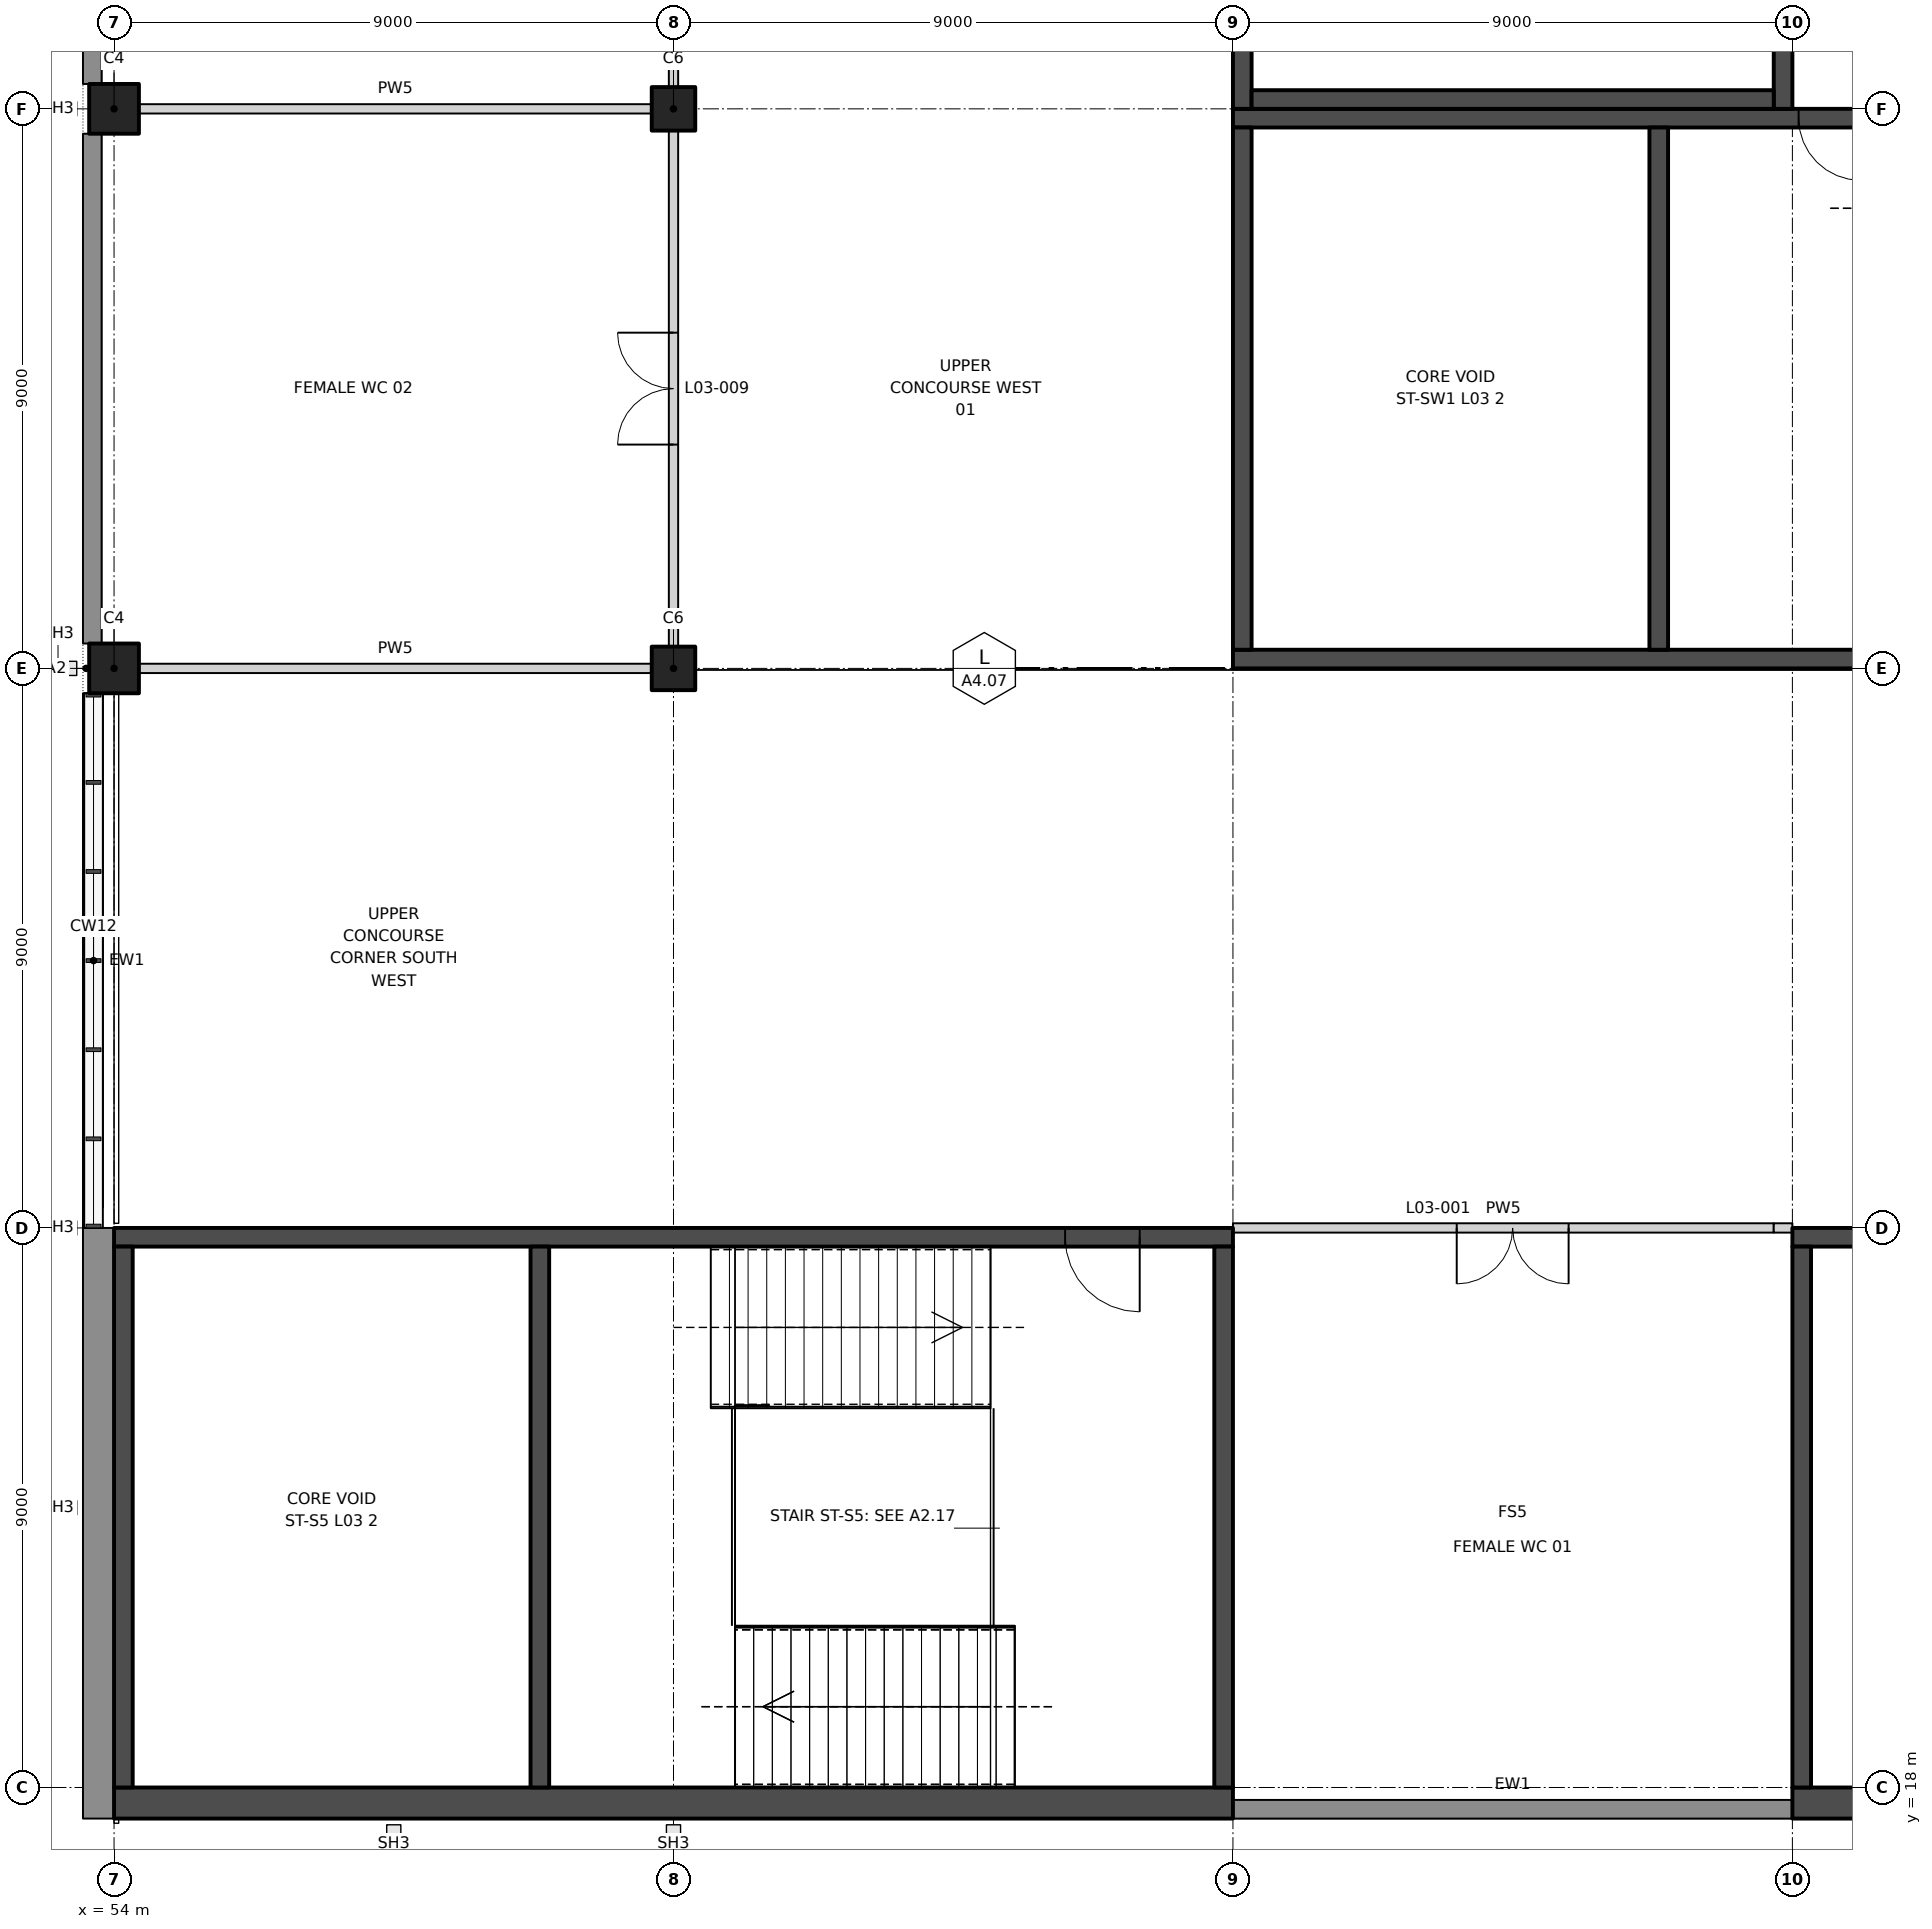
"""IFC4 building model, lengths in metres.
Left out: names, types, materials, properties, quantities, classifications, styles, units other than length and angle.
Written with IfcOpenShell. Run it as: python <this file> out.ifc"""

import sys

from ifc_helpers import new_model, si_unit, direction, frame, frame_2d, origin, origin_2d, place, context, subcontext, project, spatial, rectangle, extrude, element, fill, save


model = new_model("IFC4")
c1 = context("Model", 3, precision=1e-05, world=origin(), true_north=direction((0.0, 1.0)))
c2 = subcontext(c1, "Body", "Model", "MODEL_VIEW")
j1 = project(units=[si_unit("LENGTHUNIT", "METRE"), si_unit("PLANEANGLEUNIT", "RADIAN")], contexts=[c1])
p1 = place(None, origin())
s1 = spatial("IfcSite", under=j1, at=p1, CompositionType="ELEMENT")
p2 = place(p1, origin())
s2 = spatial("IfcBuilding", under=s1, at=p2, CompositionType="ELEMENT")
p3 = place(p2, frame((0.0, 0.0, 22.0)))
s3 = spatial("IfcBuildingStorey", under=s2, at=p3, CompositionType="ELEMENT", Elevation=22.0)
for number, where, z_axis, x_axis in (
    (1, (54.0, 36.0, 0.0), (0.0, 0.0, 1.0), (1.0, 0.0, 0.0)),
    (2, (54.0, 45.0, 0.0), (0.0, 0.0, 1.0), (1.0, 0.0, 0.0)),
):
    element("IfcColumn", number, at=place(p3, frame(where, z_axis=z_axis, x_axis=x_axis)), inside=s3, PredefinedType="COLUMN", context=c2, shape_type="SweptSolid", body=[
        extrude(rectangle(XDim=0.8, YDim=0.8, at=origin_2d()), origin(), (0.0, 0.0, 1.0), 6.0),
    ])
for number, where, z_axis, x_axis in (
    (3, (63.0, 36.0, 0.0), (0.0, 0.0, 1.0), (1.0, 0.0, 0.0)),
    (4, (63.0, 45.0, 0.0), (0.0, 0.0, 1.0), (1.0, 0.0, 0.0)),
):
    element("IfcColumn", number, at=place(p3, frame(where, z_axis=z_axis, x_axis=x_axis)), inside=s3, PredefinedType="COLUMN", context=c2, shape_type="SweptSolid", body=[
        extrude(rectangle(XDim=0.7, YDim=0.7, at=origin_2d()), origin(), (0.0, 0.0, 1.0), 6.0),
    ])
p4 = place(p3, frame((72.0, 27.0, 0.0), z_axis=(0.0, 0.0, 1.0), x_axis=(1.0, 0.0, 0.0)))
e5 = element("IfcWall", 5, at=p4, inside=s3, PredefinedType="PARTITIONING", context=c2, shape_type="SweptSolid", body=[
    extrude(rectangle(XDim=8.7, YDim=0.15, at=frame_2d((4.35, 0.0))), origin(), (0.0, 0.0, 1.0), 4.7),
])
p5 = place(p4, frame((3.6, 0.0, 0.0)))
e6 = element("IfcOpeningElement", 6, at=p5, cuts=e5, PredefinedType="OPENING", context=c2, shape_type="SweptSolid", body=[
    extrude(rectangle(XDim=1.8, YDim=2.1, at=frame_2d((0.9, 1.05))), frame((0.0, 0.085, 0.0), z_axis=(0.0, -1.0, 0.0), x_axis=(1.0, 0.0, 0.0)), (0.0, 0.0, 1.0), 0.17),
])
for number, where, z_axis, x_axis in (
    (7, (54.4, 36.0, 0.0), (0.0, 0.0, 1.0), (1.0, 0.0, 0.0)),
    (8, (54.4, 45.0, 0.0), (0.0, 0.0, 1.0), (1.0, 0.0, 0.0)),
):
    element("IfcWall", number, at=place(p3, frame(where, z_axis=z_axis, x_axis=x_axis)), inside=s3, PredefinedType="PARTITIONING", context=c2, shape_type="SweptSolid", body=[
        extrude(rectangle(XDim=8.25, YDim=0.15, at=frame_2d((4.125, 0.0))), origin(), (0.0, 0.0, 1.0), 4.8),
    ])
p6 = place(p3, frame((63.0, 36.35, 0.0), z_axis=(0.0, 0.0, 1.0), x_axis=(0.0, 1.0, 0.0)))
e9 = element("IfcWall", 9, at=p6, inside=s3, PredefinedType="PARTITIONING", context=c2, shape_type="SweptSolid", body=[
    extrude(rectangle(XDim=8.3, YDim=0.15, at=frame_2d((4.15, 0.0))), origin(), (0.0, 0.0, 1.0), 4.8),
])
p7 = place(p6, frame((3.25, 0.0, 0.0)))
e10 = element("IfcOpeningElement", 10, at=p7, cuts=e9, PredefinedType="OPENING", context=c2, shape_type="SweptSolid", body=[
    extrude(rectangle(XDim=1.8, YDim=2.1, at=frame_2d((0.9, 1.05))), frame((0.0, 0.085, 0.0), z_axis=(0.0, -1.0, 0.0), x_axis=(1.0, 0.0, 0.0)), (0.0, 0.0, 1.0), 0.17),
])
p8 = place(p3, frame((63.0, 45.35, 0.0), z_axis=(0.0, 0.0, 1.0), x_axis=(0.0, 1.0, 0.0)))
e11 = element("IfcWall", 11, at=p8, inside=s3, PredefinedType="PARTITIONING", context=c2, shape_type="SweptSolid", body=[
    extrude(rectangle(XDim=8.65, YDim=0.15, at=frame_2d((4.325, 0.0))), origin(), (0.0, 0.0, 1.0), 4.7),
])
p9 = place(p8, frame((3.425, 0.0, 0.0)))
e12 = element("IfcOpeningElement", 12, at=p9, cuts=e11, PredefinedType="OPENING", context=c2, shape_type="SweptSolid", body=[
    extrude(rectangle(XDim=1.8, YDim=2.1, at=frame_2d((0.9, 1.05))), frame((0.0, 0.085, 0.0), z_axis=(0.0, -1.0, 0.0), x_axis=(1.0, 0.0, 0.0)), (0.0, 0.0, 1.0), 0.17),
])
p10 = place(p3, frame((72.0, 17.65, 0.0), z_axis=(0.0, 0.0, 1.0), x_axis=(1.0, 0.0, 0.0)))
e13 = element("IfcWall", 13, at=p10, inside=s3, PredefinedType="SOLIDWALL", context=c2, shape_type="SweptSolid", body=[
    extrude(rectangle(XDim=9.0, YDim=0.3, at=frame_2d((4.5, 0.0))), origin(), (0.0, 0.0, 1.0), 6.0),
])
p11 = place(p3, frame((53.75, 27.0, 0.0), z_axis=(0.0, 0.0, 1.0), x_axis=(0.0, -1.0, 0.0)))
e14 = element("IfcWall", 14, at=p11, inside=s3, PredefinedType="SOLIDWALL", context=c2, shape_type="SweptSolid", body=[
    extrude(rectangle(XDim=9.5, YDim=0.5, at=frame_2d((4.75, 0.0))), origin(), (0.0, 0.0, 1.0), 6.0),
])
p12 = place(p3, frame((53.65, 35.6, 0.0), z_axis=(0.0, 0.0, 1.0), x_axis=(0.0, -1.0, 0.0)))
e15 = element("IfcWall", 15, at=p12, inside=s3, PredefinedType="SOLIDWALL", context=c2, shape_type="SweptSolid", body=[
    extrude(rectangle(XDim=8.6, YDim=0.3, at=frame_2d((4.3, 0.0))), origin(), (0.0, 0.0, 1.0), 1.0),
])
p13 = place(p3, frame((53.65, 44.6, 0.0), z_axis=(0.0, 0.0, 1.0), x_axis=(0.0, -1.0, 0.0)))
e16 = element("IfcWall", 16, at=p13, inside=s3, PredefinedType="SOLIDWALL", context=c2, shape_type="SweptSolid", body=[
    extrude(rectangle(XDim=8.2, YDim=0.3, at=frame_2d((4.1, 0.0))), origin(), (0.0, 0.0, 1.0), 6.0),
])
p14 = place(p3, frame((53.65, 54.0, 0.0), z_axis=(0.0, 0.0, 1.0), x_axis=(0.0, -1.0, 0.0)))
e17 = element("IfcWall", 17, at=p14, inside=s3, PredefinedType="SOLIDWALL", context=c2, shape_type="SweptSolid", body=[
    extrude(rectangle(XDim=8.6, YDim=0.3, at=frame_2d((4.3, 0.0))), origin(), (0.0, 0.0, 1.0), 6.0),
])
p15 = place(p3, frame((81.0, 26.85, 0.0), z_axis=(0.0, 0.0, 1.0), x_axis=(1.0, 0.0, 0.0)))
e18 = element("IfcWall", 18, at=p15, inside=s3, PredefinedType="SHEAR", context=c2, shape_type="SweptSolid", body=[
    extrude(rectangle(XDim=18.0, YDim=0.3, at=frame_2d((9.0, 0.0))), origin(), (0.0, 0.0, 1.0), 6.0),
])
p16 = place(p15, frame((1.5, 0.0, 0.0)))
e19 = element("IfcOpeningElement", 19, at=p16, cuts=e18, PredefinedType="OPENING", context=c2, shape_type="SweptSolid", body=[
    extrude(rectangle(XDim=1.2, YDim=2.1, at=frame_2d((0.6, 1.05))), frame((0.0, 0.16, 0.0), z_axis=(0.0, -1.0, 0.0), x_axis=(1.0, 0.0, 0.0)), (0.0, 0.0, 1.0), 0.32),
])
p17 = place(p3, frame((81.0, 17.75, 0.0), z_axis=(0.0, 0.0, 1.0), x_axis=(1.0, 0.0, 0.0)))
e20 = element("IfcWall", 20, at=p17, inside=s3, PredefinedType="SHEAR", context=c2, shape_type="SweptSolid", body=[
    extrude(rectangle(XDim=18.0, YDim=0.5, at=frame_2d((9.0, 0.0))), origin(), (0.0, 0.0, 1.0), 6.0),
])
p18 = place(p3, frame((81.15, 26.7, 0.0), z_axis=(0.0, 0.0, 1.0), x_axis=(0.0, -1.0, 0.0)))
e21 = element("IfcWall", 21, at=p18, inside=s3, PredefinedType="SHEAR", context=c2, shape_type="SweptSolid", body=[
    extrude(rectangle(XDim=8.7, YDim=0.3, at=frame_2d((4.35, 0.0))), origin(), (0.0, 0.0, 1.0), 6.0),
])
p19 = place(p3, frame((72.0, 26.85, 0.0), z_axis=(0.0, 0.0, 1.0), x_axis=(-1.0, 0.0, 0.0)))
e22 = element("IfcWall", 22, at=p19, inside=s3, PredefinedType="SHEAR", context=c2, shape_type="SweptSolid", body=[
    extrude(rectangle(XDim=18.0, YDim=0.3, at=frame_2d((9.0, 0.0))), origin(), (0.0, 0.0, 1.0), 6.0),
])
p20 = place(p19, frame((1.5, 0.0, 0.0)))
e23 = element("IfcOpeningElement", 23, at=p20, cuts=e22, PredefinedType="OPENING", context=c2, shape_type="SweptSolid", body=[
    extrude(rectangle(XDim=1.2, YDim=2.1, at=frame_2d((0.6, 1.05))), frame((0.0, 0.16, 0.0), z_axis=(0.0, -1.0, 0.0), x_axis=(1.0, 0.0, 0.0)), (0.0, 0.0, 1.0), 0.32),
])
p21 = place(p3, frame((72.0, 17.75, 0.0), z_axis=(0.0, 0.0, 1.0), x_axis=(-1.0, 0.0, 0.0)))
e24 = element("IfcWall", 24, at=p21, inside=s3, PredefinedType="SHEAR", context=c2, shape_type="SweptSolid", body=[
    extrude(rectangle(XDim=18.0, YDim=0.5, at=frame_2d((9.0, 0.0))), origin(), (0.0, 0.0, 1.0), 6.0),
])
for number, where, z_axis, x_axis in (
    (25, (71.85, 26.7, 0.0), (0.0, 0.0, 1.0), (0.0, -1.0, 0.0)),
    (26, (54.15, 26.7, 0.0), (0.0, 0.0, 1.0), (0.0, -1.0, 0.0)),
    (27, (60.85, 26.7, 0.0), (0.0, 0.0, 1.0), (0.0, -1.0, 0.0)),
):
    element("IfcWall", number, at=place(p3, frame(where, z_axis=z_axis, x_axis=x_axis)), inside=s3, PredefinedType="SHEAR", context=c2, shape_type="SweptSolid", body=[
        extrude(rectangle(XDim=8.7, YDim=0.3, at=frame_2d((4.35, 0.0))), origin(), (0.0, 0.0, 1.0), 6.0),
    ])
p22 = place(p3, frame((90.25, 44.85, 0.0), z_axis=(0.0, 0.0, 1.0), x_axis=(-1.0, 0.0, 0.0)))
e28 = element("IfcWall", 28, at=p22, inside=s3, PredefinedType="SHEAR", context=c2, shape_type="SweptSolid", body=[
    extrude(rectangle(XDim=18.25, YDim=0.3, at=frame_2d((9.125, 0.0))), origin(), (0.0, 0.0, 1.0), 6.0),
])
p23 = place(p22, frame((8.15, 0.0, 0.0)))
e29 = element("IfcOpeningElement", 29, at=p23, cuts=e28, PredefinedType="OPENING", context=c2, shape_type="SweptSolid", body=[
    extrude(rectangle(XDim=1.0, YDim=2.1, at=frame_2d((0.5, 1.05))), frame((0.0, 0.16, 0.0), z_axis=(0.0, -1.0, 0.0), x_axis=(1.0, 0.0, 0.0)), (0.0, 0.0, 1.0), 0.32),
])
p24 = place(p3, frame((90.0, 36.15, 0.0), z_axis=(0.0, 0.0, 1.0), x_axis=(-1.0, 0.0, 0.0)))
e30 = element("IfcWall", 30, at=p24, inside=s3, PredefinedType="SHEAR", context=c2, shape_type="SweptSolid", body=[
    extrude(rectangle(XDim=18.0, YDim=0.3, at=frame_2d((9.0, 0.0))), origin(), (0.0, 0.0, 1.0), 6.0),
])
for number, where, z_axis, x_axis in (
    (31, (72.15, 44.7, 0.0), (0.0, 0.0, 1.0), (0.0, -1.0, 0.0)),
    (32, (78.85, 44.7, 0.0), (0.0, 0.0, 1.0), (0.0, -1.0, 0.0)),
):
    element("IfcWall", number, at=place(p3, frame(where, z_axis=z_axis, x_axis=x_axis)), inside=s3, PredefinedType="SHEAR", context=c2, shape_type="SweptSolid", body=[
        extrude(rectangle(XDim=8.4, YDim=0.3, at=frame_2d((4.2, 0.0))), origin(), (0.0, 0.0, 1.0), 6.0),
    ])
p25 = place(p3, frame((80.85, 63.0, 0.0), z_axis=(0.0, 0.0, 1.0), x_axis=(0.0, -1.0, 0.0)))
e33 = element("IfcWall", 33, at=p25, inside=s3, PredefinedType="SHEAR", context=c2, shape_type="SweptSolid", body=[
    extrude(rectangle(XDim=18.0, YDim=0.3, at=frame_2d((9.0, 0.0))), origin(), (0.0, 0.0, 1.0), 6.0),
])
p26 = place(p25, frame((8.6, 0.0, 0.0)))
e34 = element("IfcOpeningElement", 34, at=p26, cuts=e33, PredefinedType="OPENING", context=c2, shape_type="SweptSolid", body=[
    extrude(rectangle(XDim=1.2, YDim=2.1, at=frame_2d((0.6, 1.05))), frame((0.0, 0.16, 0.0), z_axis=(0.0, -1.0, 0.0), x_axis=(1.0, 0.0, 0.0)), (0.0, 0.0, 1.0), 0.32),
])
p27 = place(p3, frame((72.15, 63.0, 0.0), z_axis=(0.0, 0.0, 1.0), x_axis=(0.0, -1.0, 0.0)))
e35 = element("IfcWall", 35, at=p27, inside=s3, PredefinedType="SHEAR", context=c2, shape_type="SweptSolid", body=[
    extrude(rectangle(XDim=18.0, YDim=0.3, at=frame_2d((9.0, 0.0))), origin(), (0.0, 0.0, 1.0), 6.0),
])
p28 = place(p3, frame((80.7, 45.15, 0.0), z_axis=(0.0, 0.0, 1.0), x_axis=(-1.0, 0.0, 0.0)))
e36 = element("IfcWall", 36, at=p28, inside=s3, PredefinedType="SHEAR", context=c2, shape_type="SweptSolid", body=[
    extrude(rectangle(XDim=8.4, YDim=0.3, at=frame_2d((4.2, 0.0))), origin(), (0.0, 0.0, 1.0), 6.0),
])
p29 = place(p3, frame((80.7, 27.0, 0.0), z_axis=(0.0, 0.0, 1.0), x_axis=(1.0, 0.0, 0.0)))
e37 = element("IfcWall", 37, at=p29, inside=s3, PredefinedType="PARTITIONING", context=c2, shape_type="SweptSolid", body=[
    extrude(rectangle(XDim=0.3, YDim=0.15, at=frame_2d((0.15, 0.0))), origin(), (0.0, 0.0, 1.0), 6.0),
])
p30 = place(p5, frame((1.8, 0.0, 0.0), z_axis=(0.0, 0.0, 1.0), x_axis=(-1.0, 0.0, 0.0)))
e38 = element("IfcDoor", 38, at=p30, inside=s3, OperationType="DOUBLE_DOOR_DOUBLE_SWING", PredefinedType="DOOR", context=c2, shape_type="SweptSolid", body=[
    extrude(rectangle(XDim=1.8, YDim=2.1, at=frame_2d((0.9, 1.05))), frame((0.0, 0.025, 0.0), z_axis=(0.0, -1.0, 0.0), x_axis=(1.0, 0.0, 0.0)), (0.0, 0.0, 1.0), 0.05),
])
fill(e6, e38)
p31 = place(p7, origin())
e39 = element("IfcDoor", 39, at=p31, inside=s3, OperationType="DOUBLE_DOOR_DOUBLE_SWING", PredefinedType="DOOR", context=c2, shape_type="SweptSolid", body=[
    extrude(rectangle(XDim=1.8, YDim=2.1, at=frame_2d((0.9, 1.05))), frame((0.0, 0.025, 0.0), z_axis=(0.0, -1.0, 0.0), x_axis=(1.0, 0.0, 0.0)), (0.0, 0.0, 1.0), 0.05),
])
fill(e10, e39)
p32 = place(p20, origin())
e40 = element("IfcDoor", 40, at=p32, inside=s3, OperationType="SINGLE_SWING_LEFT", PredefinedType="DOOR", context=c2, shape_type="SweptSolid", body=[
    extrude(rectangle(XDim=1.2, YDim=2.1, at=frame_2d((0.6, 1.05))), frame((0.0, 0.025, 0.0), z_axis=(0.0, -1.0, 0.0), x_axis=(1.0, 0.0, 0.0)), (0.0, 0.0, 1.0), 0.05),
])
fill(e23, e40)
p33 = place(p23, origin())
e41 = element("IfcDoor", 41, at=p33, inside=s3, OperationType="SINGLE_SWING_LEFT", PredefinedType="DOOR", context=c2, shape_type="SweptSolid", body=[
    extrude(rectangle(XDim=1.0, YDim=2.1, at=frame_2d((0.5, 1.05))), frame((0.0, 0.025, 0.0), z_axis=(0.0, -1.0, 0.0), x_axis=(1.0, 0.0, 0.0)), (0.0, 0.0, 1.0), 0.05),
])
fill(e29, e41)
save(model, sys.argv[1])
